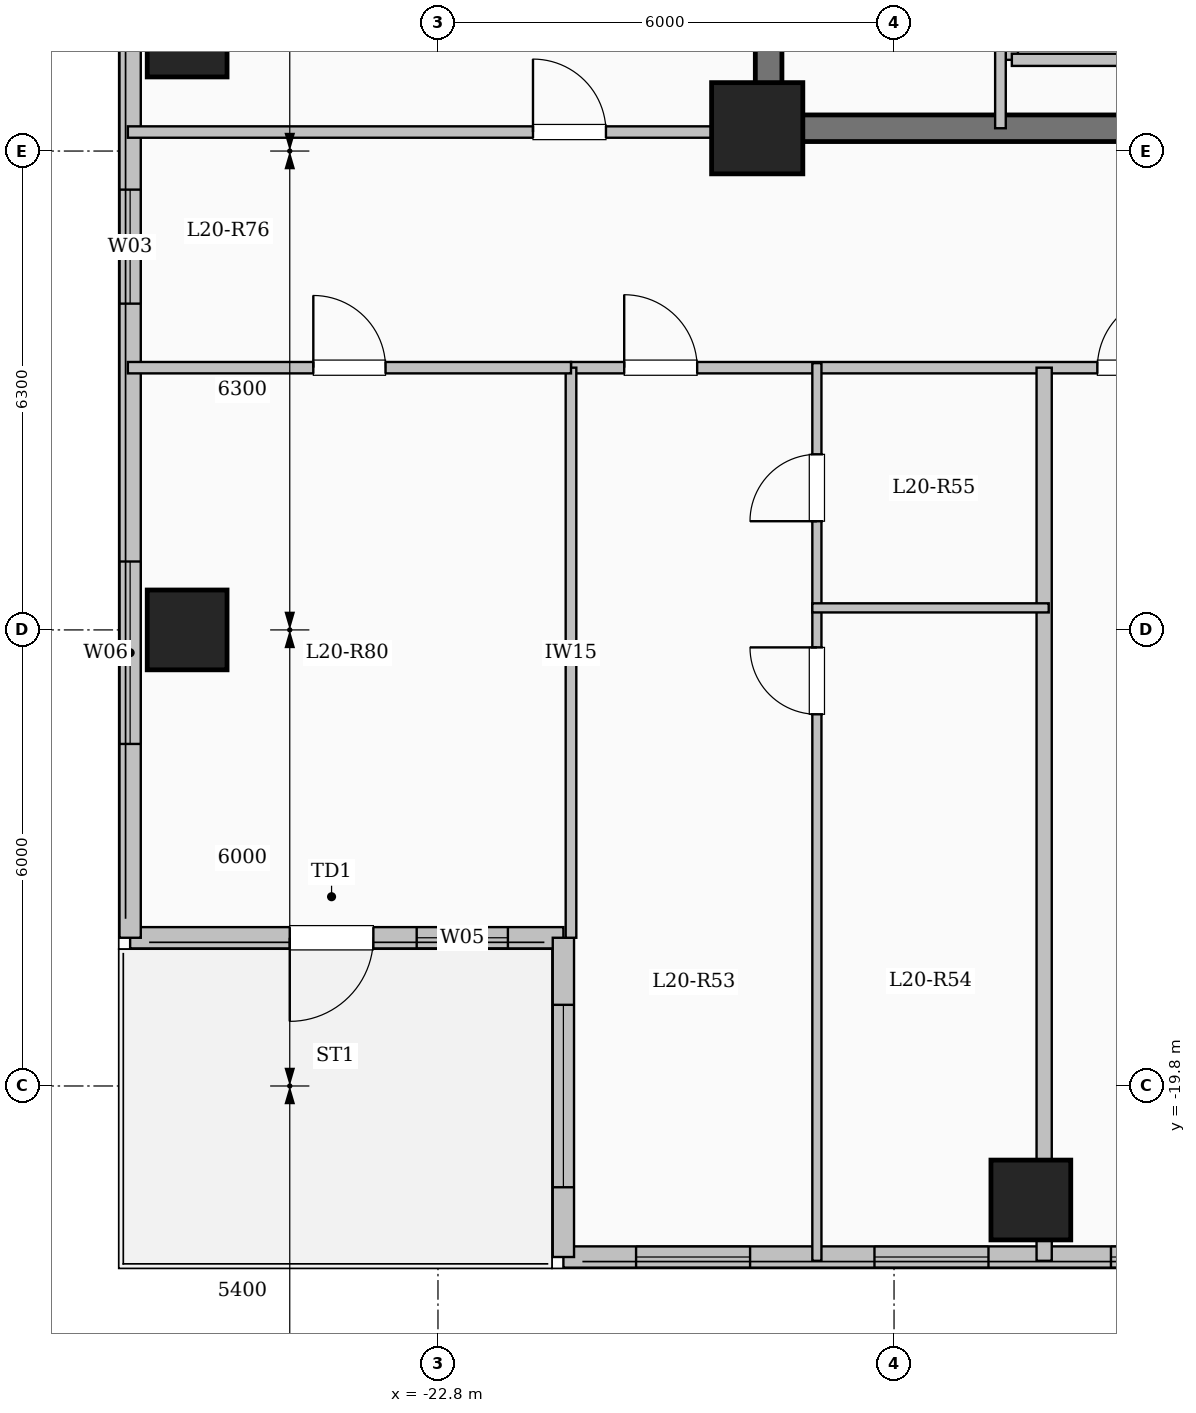
"""IFC4 building model, lengths in metres.
Left out: names, types, materials, properties, quantities, classifications, styles, units other than length and angle.
Written with IfcOpenShell. Run it as: python <this file> out.ifc"""

import sys

from ifc_helpers import new_model, si_unit, direction, frame, frame_2d, origin, origin_2d, place, context, subcontext, project, spatial, rectangle, extrude, element, fill, save


model = new_model("IFC4")
c1 = context("Model", 3, precision=1e-05, world=origin(), true_north=direction((0.0, 1.0)))
c2 = subcontext(c1, "Body", "Model", "MODEL_VIEW")
j1 = project(units=[si_unit("LENGTHUNIT", "METRE"), si_unit("PLANEANGLEUNIT", "RADIAN")], contexts=[c1])
p1 = place(None, origin())
s1 = spatial("IfcSite", under=j1, at=p1, CompositionType="ELEMENT")
p2 = place(p1, origin())
s2 = spatial("IfcBuilding", under=s1, at=p2, CompositionType="ELEMENT")
p3 = place(p2, frame((0.0, 0.0, 78.3)))
s3 = spatial("IfcBuildingStorey", under=s2, at=p3, CompositionType="ELEMENT", Elevation=78.3)
p4 = place(p3, frame((-18.6, -7.2, 0.0), z_axis=(0.0, 0.0, 1.0), x_axis=(1.0, 0.0, 0.0)))
e1 = element("IfcColumn", 1, at=p4, inside=s3, PredefinedType="COLUMN", context=c2, shape_type="SweptSolid", body=[
    extrude(rectangle(XDim=1.2, YDim=1.2, at=origin_2d()), origin(), (0.0, 0.0, 1.0), 3.35),
])
for number, where, z_axis, x_axis in (
    (2, (-15.0, -21.3, 0.0), (0.0, 0.0, 1.0), (1.0, 0.0, 0.0)),
    (3, (-26.1, -13.8, 0.0), (0.0, 0.0, 1.0), (1.0, 0.0, 0.0)),
    (4, (-26.1, -6.0, 0.0), (0.0, 0.0, 1.0), (1.0, 0.0, 0.0)),
):
    element("IfcColumn", number, at=place(p3, frame(where, z_axis=z_axis, x_axis=x_axis)), inside=s3, PredefinedType="COLUMN", context=c2, shape_type="SweptSolid", body=[
        extrude(rectangle(XDim=1.05, YDim=1.05, at=origin_2d()), origin(), (0.0, 0.0, 1.0), 3.35),
    ])
p5 = place(p3, frame((-21.15, -17.85, 0.0), z_axis=(0.0, 0.0, 1.0), x_axis=(-1.0, 0.0, 0.0)))
e5 = element("IfcWall", 5, at=p5, inside=s3, PredefinedType="SOLIDWALL", context=c2, shape_type="SweptSolid", body=[
    extrude(rectangle(XDim=5.7, YDim=0.28, at=frame_2d((2.85, 0.0))), origin(), (0.0, 0.0, 1.0), 3.1),
])
p6 = place(p5, frame((2.5, 0.0, 0.0)))
e6 = element("IfcOpeningElement", 6, at=p6, cuts=e5, PredefinedType="OPENING", context=c2, shape_type="SweptSolid", body=[
    extrude(rectangle(XDim=1.1, YDim=2.2, at=frame_2d((0.55, 1.1))), frame((0.0, 0.15, 0.0), z_axis=(0.0, -1.0, 0.0), x_axis=(1.0, 0.0, 0.0)), (0.0, 0.0, 1.0), 0.3),
])
p7 = place(p5, frame((0.73, 0.0, 0.95)))
e7 = element("IfcOpeningElement", 7, at=p7, cuts=e5, PredefinedType="OPENING", context=c2, shape_type="SweptSolid", body=[
    extrude(rectangle(XDim=1.2, YDim=1.5, at=frame_2d((0.6, 0.75))), frame((0.0, 0.15, 0.0), z_axis=(0.0, -1.0, 0.0), x_axis=(1.0, 0.0, 0.0)), (0.0, 0.0, 1.0), 0.3),
])
p8 = place(p3, frame((-26.85, -17.85, 0.0), z_axis=(0.0, 0.0, 1.0), x_axis=(0.0, 1.0, 0.0)))
e8 = element("IfcWall", 8, at=p8, inside=s3, PredefinedType="SOLIDWALL", context=c2, shape_type="SweptSolid", body=[
    extrude(rectangle(XDim=35.7, YDim=0.28, at=frame_2d((17.85, 0.0))), origin(), (0.0, 0.0, 1.0), 3.1),
])
p9 = place(p8, frame((2.55, 0.0, 0.9)))
e9 = element("IfcOpeningElement", 9, at=p9, cuts=e8, PredefinedType="OPENING", context=c2, shape_type="SweptSolid", body=[
    extrude(rectangle(XDim=2.4, YDim=1.8, at=frame_2d((1.2, 0.9))), frame((0.0, 0.15, 0.0), z_axis=(0.0, -1.0, 0.0), x_axis=(1.0, 0.0, 0.0)), (0.0, 0.0, 1.0), 0.3),
])
p10 = place(p8, frame((8.343, 0.0, 0.9)))
e10 = element("IfcOpeningElement", 10, at=p10, cuts=e8, PredefinedType="OPENING", context=c2, shape_type="SweptSolid", body=[
    extrude(rectangle(XDim=1.5, YDim=1.65, at=frame_2d((0.75, 0.825))), frame((0.0, 0.15, 0.0), z_axis=(0.0, -1.0, 0.0), x_axis=(1.0, 0.0, 0.0)), (0.0, 0.0, 1.0), 0.3),
])
p11 = place(p8, frame((13.75, 0.0, 0.9)))
e11 = element("IfcOpeningElement", 11, at=p11, cuts=e8, PredefinedType="OPENING", context=c2, shape_type="SweptSolid", body=[
    extrude(rectangle(XDim=2.4, YDim=1.8, at=frame_2d((1.2, 0.9))), frame((0.0, 0.15, 0.0), z_axis=(0.0, -1.0, 0.0), x_axis=(1.0, 0.0, 0.0)), (0.0, 0.0, 1.0), 0.3),
])
p12 = place(p8, frame((20.175, 0.0, 0.9)))
e12 = element("IfcOpeningElement", 12, at=p12, cuts=e8, PredefinedType="OPENING", context=c2, shape_type="SweptSolid", body=[
    extrude(rectangle(XDim=1.8, YDim=1.65, at=frame_2d((0.9, 0.825))), frame((0.0, 0.15, 0.0), z_axis=(0.0, -1.0, 0.0), x_axis=(1.0, 0.0, 0.0)), (0.0, 0.0, 1.0), 0.3),
])
p13 = place(p8, frame((24.725, 0.0, 0.9)))
e13 = element("IfcOpeningElement", 13, at=p13, cuts=e8, PredefinedType="OPENING", context=c2, shape_type="SweptSolid", body=[
    extrude(rectangle(XDim=2.0, YDim=1.7, at=frame_2d((1.0, 0.85))), frame((0.0, 0.15, 0.0), z_axis=(0.0, -1.0, 0.0), x_axis=(1.0, 0.0, 0.0)), (0.0, 0.0, 1.0), 0.3),
])
p14 = place(p8, frame((28.975, 0.0, 0.95)))
e14 = element("IfcOpeningElement", 14, at=p14, cuts=e8, PredefinedType="OPENING", context=c2, shape_type="SweptSolid", body=[
    extrude(rectangle(XDim=1.0, YDim=1.5, at=frame_2d((0.5, 0.75))), frame((0.0, 0.15, 0.0), z_axis=(0.0, -1.0, 0.0), x_axis=(1.0, 0.0, 0.0)), (0.0, 0.0, 1.0), 0.3),
])
p15 = place(p8, frame((32.025, 0.0, 0.9)))
e15 = element("IfcOpeningElement", 15, at=p15, cuts=e8, PredefinedType="OPENING", context=c2, shape_type="SweptSolid", body=[
    extrude(rectangle(XDim=2.0, YDim=1.7, at=frame_2d((1.0, 0.85))), frame((0.0, 0.15, 0.0), z_axis=(0.0, -1.0, 0.0), x_axis=(1.0, 0.0, 0.0)), (0.0, 0.0, 1.0), 0.3),
])
p16 = place(p3, frame((-7.35, -22.05, 0.0), z_axis=(0.0, 0.0, 1.0), x_axis=(-1.0, 0.0, 0.0)))
e16 = element("IfcWall", 16, at=p16, inside=s3, PredefinedType="SOLIDWALL", context=c2, shape_type="SweptSolid", body=[
    extrude(rectangle(XDim=13.8, YDim=0.28, at=frame_2d((6.9, 0.0))), origin(), (0.0, 0.0, 1.0), 3.1),
])
p17 = place(p16, frame((0.147, 0.0, 0.95)))
e17 = element("IfcOpeningElement", 17, at=p17, cuts=e16, PredefinedType="OPENING", context=c2, shape_type="SweptSolid", body=[
    extrude(rectangle(XDim=0.85, YDim=1.5, at=frame_2d((0.425, 0.75))), frame((0.0, 0.15, 0.0), z_axis=(0.0, -1.0, 0.0), x_axis=(1.0, 0.0, 0.0)), (0.0, 0.0, 1.0), 0.3),
])
p18 = place(p16, frame((1.985, 0.0, 0.9)))
e18 = element("IfcOpeningElement", 18, at=p18, cuts=e16, PredefinedType="OPENING", context=c2, shape_type="SweptSolid", body=[
    extrude(rectangle(XDim=1.5, YDim=1.65, at=frame_2d((0.75, 0.825))), frame((0.0, 0.15, 0.0), z_axis=(0.0, -1.0, 0.0), x_axis=(1.0, 0.0, 0.0)), (0.0, 0.0, 1.0), 0.3),
])
p19 = place(p16, frame((5.096, 0.0, 0.9)))
e19 = element("IfcOpeningElement", 19, at=p19, cuts=e16, PredefinedType="OPENING", context=c2, shape_type="SweptSolid", body=[
    extrude(rectangle(XDim=1.5, YDim=1.65, at=frame_2d((0.75, 0.825))), frame((0.0, 0.15, 0.0), z_axis=(0.0, -1.0, 0.0), x_axis=(1.0, 0.0, 0.0)), (0.0, 0.0, 1.0), 0.3),
])
p20 = place(p16, frame((8.208, 0.0, 0.9)))
e20 = element("IfcOpeningElement", 20, at=p20, cuts=e16, PredefinedType="OPENING", context=c2, shape_type="SweptSolid", body=[
    extrude(rectangle(XDim=1.5, YDim=1.65, at=frame_2d((0.75, 0.825))), frame((0.0, 0.15, 0.0), z_axis=(0.0, -1.0, 0.0), x_axis=(1.0, 0.0, 0.0)), (0.0, 0.0, 1.0), 0.3),
])
p21 = place(p16, frame((11.344, 0.0, 0.9)))
e21 = element("IfcOpeningElement", 21, at=p21, cuts=e16, PredefinedType="OPENING", context=c2, shape_type="SweptSolid", body=[
    extrude(rectangle(XDim=1.5, YDim=1.65, at=frame_2d((0.75, 0.825))), frame((0.0, 0.15, 0.0), z_axis=(0.0, -1.0, 0.0), x_axis=(1.0, 0.0, 0.0)), (0.0, 0.0, 1.0), 0.3),
])
p22 = place(p3, frame((-21.15, -22.05, 0.0), z_axis=(0.0, 0.0, 1.0), x_axis=(0.0, 1.0, 0.0)))
e22 = element("IfcWall", 22, at=p22, inside=s3, PredefinedType="SOLIDWALL", context=c2, shape_type="SweptSolid", body=[
    extrude(rectangle(XDim=4.2, YDim=0.28, at=frame_2d((2.1, 0.0))), origin(), (0.0, 0.0, 1.0), 3.1),
])
p23 = place(p22, frame((0.918, 0.0, 0.9)))
e23 = element("IfcOpeningElement", 23, at=p23, cuts=e22, PredefinedType="OPENING", context=c2, shape_type="SweptSolid", body=[
    extrude(rectangle(XDim=2.4, YDim=1.8, at=frame_2d((1.2, 0.9))), frame((0.0, 0.15, 0.0), z_axis=(0.0, -1.0, 0.0), x_axis=(1.0, 0.0, 0.0)), (0.0, 0.0, 1.0), 0.3),
])
p24 = place(p3, frame((-15.25, -6.3, 0.0), z_axis=(0.0, 0.0, 1.0), x_axis=(0.0, 1.0, 0.0)))
e24 = element("IfcWall", 24, at=p24, inside=s3, PredefinedType="SOLIDWALL", context=c2, shape_type="SweptSolid", body=[
    extrude(rectangle(XDim=2.6, YDim=0.16, at=frame_2d((1.3, 0.0))), origin(), (0.0, 0.0, 1.0), 3.1),
])
p25 = place(p3, frame((-15.25, -6.3, 0.0), z_axis=(0.0, 0.0, 1.0), x_axis=(1.0, 0.0, 0.0)))
e25 = element("IfcWall", 25, at=p25, inside=s3, PredefinedType="SOLIDWALL", context=c2, shape_type="SweptSolid", body=[
    extrude(rectangle(XDim=2.3, YDim=0.16, at=frame_2d((1.15, 0.0))), origin(), (0.0, 0.0, 1.0), 3.1),
])
p26 = place(p3, frame((-18.45, -7.375, 0.0), z_axis=(0.0, 0.0, 1.0), x_axis=(0.0, 1.0, 0.0)))
e26 = element("IfcWall", 26, at=p26, inside=s3, PredefinedType="SHEAR", context=c2, shape_type="SweptSolid", body=[
    extrude(rectangle(XDim=14.05, YDim=0.35, at=frame_2d((7.025, 0.0))), origin(), (0.0, 0.0, 1.0), 3.35),
])
p27 = place(p3, frame((-18.625, -7.2, 0.0), z_axis=(0.0, 0.0, 1.0), x_axis=(1.0, 0.0, 0.0)))
e27 = element("IfcWall", 27, at=p27, inside=s3, PredefinedType="SHEAR", context=c2, shape_type="SweptSolid", body=[
    extrude(rectangle(XDim=8.55, YDim=0.35, at=frame_2d((4.275, 0.0))), origin(), (0.0, 0.0, 1.0), 3.35),
])
p28 = place(p3, frame((-15.4, -7.2, 0.0), z_axis=(0.0, 0.0, 1.0), x_axis=(0.0, 1.0, 0.0)))
e28 = element("IfcWall", 28, at=p28, inside=s3, PredefinedType="PARTITIONING", context=c2, shape_type="SweptSolid", body=[
    extrude(rectangle(XDim=10.45, YDim=0.14, at=frame_2d((5.225, 0.0))), origin(), (0.0, 0.0, 1.0), 3.1),
])
p29 = place(p28, frame((9.25, 0.0, 0.0)))
e29 = element("IfcOpeningElement", 29, at=p29, cuts=e28, PredefinedType="OPENING", context=c2, shape_type="SweptSolid", body=[
    extrude(rectangle(XDim=0.9, YDim=2.08, at=frame_2d((0.45, 1.04))), frame((0.0, 0.08, 0.0), z_axis=(0.0, -1.0, 0.0), x_axis=(1.0, 0.0, 0.0)), (0.0, 0.0, 1.0), 0.16),
])
p30 = place(p3, frame((-21.05, -10.35, 0.0), z_axis=(0.0, 0.0, 1.0), x_axis=(1.0, 0.0, 0.0)))
e30 = element("IfcWall", 30, at=p30, inside=s3, PredefinedType="PARTITIONING", context=c2, shape_type="SweptSolid", body=[
    extrude(rectangle(XDim=12.5, YDim=0.15, at=frame_2d((6.25, 0.0))), origin(), (0.0, 0.0, 1.0), 3.1),
])
p31 = place(p30, frame((0.7, 0.0, 0.0)))
e31 = element("IfcOpeningElement", 31, at=p31, cuts=e30, PredefinedType="OPENING", context=c2, shape_type="SweptSolid", body=[
    extrude(rectangle(XDim=0.96, YDim=2.15, at=frame_2d((0.48, 1.075))), frame((0.0, 0.085, 0.0), z_axis=(0.0, -1.0, 0.0), x_axis=(1.0, 0.0, 0.0)), (0.0, 0.0, 1.0), 0.17),
])
p32 = place(p30, frame((6.925, 0.0, 0.0)))
e32 = element("IfcOpeningElement", 32, at=p32, cuts=e30, PredefinedType="OPENING", context=c2, shape_type="SweptSolid", body=[
    extrude(rectangle(XDim=0.96, YDim=2.15, at=frame_2d((0.48, 1.075))), frame((0.0, 0.085, 0.0), z_axis=(0.0, -1.0, 0.0), x_axis=(1.0, 0.0, 0.0)), (0.0, 0.0, 1.0), 0.17),
])
p33 = place(p3, frame((-14.825, -22.1, 0.0), z_axis=(0.0, 0.0, 1.0), x_axis=(0.0, 1.0, 0.0)))
e33 = element("IfcWall", 33, at=p33, inside=s3, PredefinedType="SOLIDWALL", context=c2, shape_type="SweptSolid", body=[
    extrude(rectangle(XDim=11.75, YDim=0.2, at=frame_2d((5.875, 0.0))), origin(), (0.0, 0.0, 1.0), 2.435),
])
p34 = place(p3, frame((-17.815, -22.1, 0.0), z_axis=(0.0, 0.0, 1.0), x_axis=(0.0, 1.0, 0.0)))
e34 = element("IfcWall", 34, at=p34, inside=s3, PredefinedType="PARTITIONING", context=c2, shape_type="SweptSolid", body=[
    extrude(rectangle(XDim=8.59, YDim=0.12, at=frame_2d((4.295, 0.0))), origin(), (0.0, 0.0, 1.0), 3.1),
])
p35 = place(p34, frame((7.19, 0.0, 0.0)))
e35 = element("IfcOpeningElement", 35, at=p35, cuts=e34, PredefinedType="OPENING", context=c2, shape_type="SweptSolid", body=[
    extrude(rectangle(XDim=0.88, YDim=2.1, at=frame_2d((0.44, 1.05))), frame((0.0, 0.07, 0.0), z_axis=(0.0, -1.0, 0.0), x_axis=(1.0, 0.0, 0.0)), (0.0, 0.0, 1.0), 0.14),
])
p36 = place(p3, frame((-17.815, -13.51, 0.0), z_axis=(0.0, 0.0, 1.0), x_axis=(0.0, 1.0, 0.0)))
e36 = element("IfcWall", 36, at=p36, inside=s3, PredefinedType="PARTITIONING", context=c2, shape_type="SweptSolid", body=[
    extrude(rectangle(XDim=3.22, YDim=0.12, at=frame_2d((1.61, 0.0))), origin(), (0.0, 0.0, 1.0), 3.1),
])
p37 = place(p36, frame((1.14, 0.0, 0.0)))
e37 = element("IfcOpeningElement", 37, at=p37, cuts=e36, PredefinedType="OPENING", context=c2, shape_type="SweptSolid", body=[
    extrude(rectangle(XDim=0.88, YDim=2.1, at=frame_2d((0.44, 1.05))), frame((0.0, 0.07, 0.0), z_axis=(0.0, -1.0, 0.0), x_axis=(1.0, 0.0, 0.0)), (0.0, 0.0, 1.0), 0.14),
])
p38 = place(p3, frame((-17.875, -13.51, 0.0), z_axis=(0.0, 0.0, 1.0), x_axis=(1.0, 0.0, 0.0)))
e38 = element("IfcWall", 38, at=p38, inside=s3, PredefinedType="PARTITIONING", context=c2, shape_type="SweptSolid", body=[
    extrude(rectangle(XDim=3.11, YDim=0.12, at=frame_2d((1.555, 0.0))), origin(), (0.0, 0.0, 1.0), 3.1),
])
p39 = place(p3, frame((-26.88, -7.25, 0.0), z_axis=(0.0, 0.0, 1.0), x_axis=(1.0, 0.0, 0.0)))
e39 = element("IfcWall", 39, at=p39, inside=s3, PredefinedType="PARTITIONING", context=c2, shape_type="SweptSolid", body=[
    extrude(rectangle(XDim=8.43, YDim=0.15, at=frame_2d((4.215, 0.0))), origin(), (0.0, 0.0, 1.0), 3.1),
])
p40 = place(p39, frame((5.33, 0.0, 0.0)))
e40 = element("IfcOpeningElement", 40, at=p40, cuts=e39, PredefinedType="OPENING", context=c2, shape_type="SweptSolid", body=[
    extrude(rectangle(XDim=0.96, YDim=2.15, at=frame_2d((0.48, 1.075))), frame((0.0, 0.085, 0.0), z_axis=(0.0, -1.0, 0.0), x_axis=(1.0, 0.0, 0.0)), (0.0, 0.0, 1.0), 0.17),
])
p41 = place(p3, frame((-21.05, -17.85, 0.0), z_axis=(0.0, 0.0, 1.0), x_axis=(0.0, 1.0, 0.0)))
e41 = element("IfcWall", 41, at=p41, inside=s3, PredefinedType="PARTITIONING", context=c2, shape_type="SweptSolid", body=[
    extrude(rectangle(XDim=7.5, YDim=0.14, at=frame_2d((3.75, 0.0))), origin(), (0.0, 0.0, 1.0), 3.1),
])
p42 = place(p3, frame((-26.88, -10.35, 0.0), z_axis=(0.0, 0.0, 1.0), x_axis=(1.0, 0.0, 0.0)))
e42 = element("IfcWall", 42, at=p42, inside=s3, PredefinedType="PARTITIONING", context=c2, shape_type="SweptSolid", body=[
    extrude(rectangle(XDim=5.83, YDim=0.15, at=frame_2d((2.915, 0.0))), origin(), (0.0, 0.0, 1.0), 3.1),
])
p43 = place(p42, frame((2.44, 0.0, 0.0)))
e43 = element("IfcOpeningElement", 43, at=p43, cuts=e42, PredefinedType="OPENING", context=c2, shape_type="SweptSolid", body=[
    extrude(rectangle(XDim=0.95, YDim=2.15, at=frame_2d((0.475, 1.075))), frame((0.0, 0.085, 0.0), z_axis=(0.0, -1.0, 0.0), x_axis=(1.0, 0.0, 0.0)), (0.0, 0.0, 1.0), 0.17),
])
p44 = place(p6, origin())
e44 = element("IfcDoor", 44, at=p44, inside=s3, OperationType="SINGLE_SWING_RIGHT", PredefinedType="DOOR", context=c2, shape_type="SweptSolid", body=[
    extrude(rectangle(XDim=1.1, YDim=2.2, at=frame_2d((0.55, 1.1))), frame((0.0, 0.025, 0.0), z_axis=(0.0, -1.0, 0.0), x_axis=(1.0, 0.0, 0.0)), (0.0, 0.0, 1.0), 0.05),
])
fill(e6, e44)
p45 = place(p7, origin())
e45 = element("IfcWindow", 45, at=p45, inside=s3, PartitioningType="SINGLE_PANEL", PredefinedType="WINDOW", context=c2, shape_type="SweptSolid", body=[
    extrude(rectangle(XDim=1.2, YDim=1.5, at=frame_2d((0.6, 0.75))), frame((0.0, 0.03, 0.0), z_axis=(0.0, -1.0, 0.0), x_axis=(1.0, 0.0, 0.0)), (0.0, 0.0, 1.0), 0.06),
])
fill(e7, e45)
p46 = place(p9, origin())
e46 = element("IfcWindow", 46, at=p46, inside=s3, PartitioningType="SINGLE_PANEL", PredefinedType="WINDOW", context=c2, shape_type="SweptSolid", body=[
    extrude(rectangle(XDim=2.4, YDim=1.8, at=frame_2d((1.2, 0.9))), frame((0.0, 0.03, 0.0), z_axis=(0.0, -1.0, 0.0), x_axis=(1.0, 0.0, 0.0)), (0.0, 0.0, 1.0), 0.06),
])
fill(e9, e46)
p47 = place(p10, origin())
e47 = element("IfcWindow", 47, at=p47, inside=s3, PartitioningType="SINGLE_PANEL", PredefinedType="WINDOW", context=c2, shape_type="SweptSolid", body=[
    extrude(rectangle(XDim=1.5, YDim=1.65, at=frame_2d((0.75, 0.825))), frame((0.0, 0.03, 0.0), z_axis=(0.0, -1.0, 0.0), x_axis=(1.0, 0.0, 0.0)), (0.0, 0.0, 1.0), 0.06),
])
fill(e10, e47)
p48 = place(p19, origin())
e48 = element("IfcWindow", 48, at=p48, inside=s3, PartitioningType="SINGLE_PANEL", PredefinedType="WINDOW", context=c2, shape_type="SweptSolid", body=[
    extrude(rectangle(XDim=1.5, YDim=1.65, at=frame_2d((0.75, 0.825))), frame((0.0, 0.03, 0.0), z_axis=(0.0, -1.0, 0.0), x_axis=(1.0, 0.0, 0.0)), (0.0, 0.0, 1.0), 0.06),
])
fill(e19, e48)
p49 = place(p20, origin())
e49 = element("IfcWindow", 49, at=p49, inside=s3, PartitioningType="SINGLE_PANEL", PredefinedType="WINDOW", context=c2, shape_type="SweptSolid", body=[
    extrude(rectangle(XDim=1.5, YDim=1.65, at=frame_2d((0.75, 0.825))), frame((0.0, 0.03, 0.0), z_axis=(0.0, -1.0, 0.0), x_axis=(1.0, 0.0, 0.0)), (0.0, 0.0, 1.0), 0.06),
])
fill(e20, e49)
p50 = place(p21, origin())
e50 = element("IfcWindow", 50, at=p50, inside=s3, PartitioningType="SINGLE_PANEL", PredefinedType="WINDOW", context=c2, shape_type="SweptSolid", body=[
    extrude(rectangle(XDim=1.5, YDim=1.65, at=frame_2d((0.75, 0.825))), frame((0.0, 0.03, 0.0), z_axis=(0.0, -1.0, 0.0), x_axis=(1.0, 0.0, 0.0)), (0.0, 0.0, 1.0), 0.06),
])
fill(e21, e50)
p51 = place(p23, origin())
e51 = element("IfcWindow", 51, at=p51, inside=s3, PartitioningType="SINGLE_PANEL", PredefinedType="WINDOW", context=c2, shape_type="SweptSolid", body=[
    extrude(rectangle(XDim=2.4, YDim=1.8, at=frame_2d((1.2, 0.9))), frame((0.0, 0.03, 0.0), z_axis=(0.0, -1.0, 0.0), x_axis=(1.0, 0.0, 0.0)), (0.0, 0.0, 1.0), 0.06),
])
fill(e23, e51)
p52 = place(p31, origin())
e52 = element("IfcDoor", 52, at=p52, inside=s3, OperationType="SINGLE_SWING_LEFT", PredefinedType="DOOR", context=c2, shape_type="SweptSolid", body=[
    extrude(rectangle(XDim=0.96, YDim=2.15, at=frame_2d((0.48, 1.075))), frame((0.0, 0.025, 0.0), z_axis=(0.0, -1.0, 0.0), x_axis=(1.0, 0.0, 0.0)), (0.0, 0.0, 1.0), 0.05),
])
fill(e31, e52)
p53 = place(p35, origin())
e53 = element("IfcDoor", 53, at=p53, inside=s3, OperationType="SINGLE_SWING_RIGHT", PredefinedType="DOOR", context=c2, shape_type="SweptSolid", body=[
    extrude(rectangle(XDim=0.88, YDim=2.1, at=frame_2d((0.44, 1.05))), frame((0.0, 0.025, 0.0), z_axis=(0.0, -1.0, 0.0), x_axis=(1.0, 0.0, 0.0)), (0.0, 0.0, 1.0), 0.05),
])
fill(e35, e53)
p54 = place(p37, origin())
e54 = element("IfcDoor", 54, at=p54, inside=s3, OperationType="SINGLE_SWING_LEFT", PredefinedType="DOOR", context=c2, shape_type="SweptSolid", body=[
    extrude(rectangle(XDim=0.88, YDim=2.1, at=frame_2d((0.44, 1.05))), frame((0.0, 0.025, 0.0), z_axis=(0.0, -1.0, 0.0), x_axis=(1.0, 0.0, 0.0)), (0.0, 0.0, 1.0), 0.05),
])
fill(e37, e54)
p55 = place(p32, origin())
e55 = element("IfcDoor", 55, at=p55, inside=s3, OperationType="SINGLE_SWING_RIGHT", PredefinedType="DOOR", context=c2, shape_type="SweptSolid", body=[
    extrude(rectangle(XDim=0.96, YDim=2.15, at=frame_2d((0.48, 1.075))), frame((0.0, 0.025, 0.0), z_axis=(0.0, -1.0, 0.0), x_axis=(1.0, 0.0, 0.0)), (0.0, 0.0, 1.0), 0.05),
])
fill(e32, e55)
p56 = place(p43, origin())
e56 = element("IfcDoor", 56, at=p56, inside=s3, OperationType="SINGLE_SWING_LEFT", PredefinedType="DOOR", context=c2, shape_type="SweptSolid", body=[
    extrude(rectangle(XDim=0.95, YDim=2.15, at=frame_2d((0.475, 1.075))), frame((0.0, 0.025, 0.0), z_axis=(0.0, -1.0, 0.0), x_axis=(1.0, 0.0, 0.0)), (0.0, 0.0, 1.0), 0.05),
])
fill(e43, e56)
p57 = place(p40, origin())
e57 = element("IfcDoor", 57, at=p57, inside=s3, OperationType="SINGLE_SWING_LEFT", PredefinedType="DOOR", context=c2, shape_type="SweptSolid", body=[
    extrude(rectangle(XDim=0.96, YDim=2.15, at=frame_2d((0.48, 1.075))), frame((0.0, 0.025, 0.0), z_axis=(0.0, -1.0, 0.0), x_axis=(1.0, 0.0, 0.0)), (0.0, 0.0, 1.0), 0.05),
])
fill(e40, e57)
save(model, sys.argv[1])
